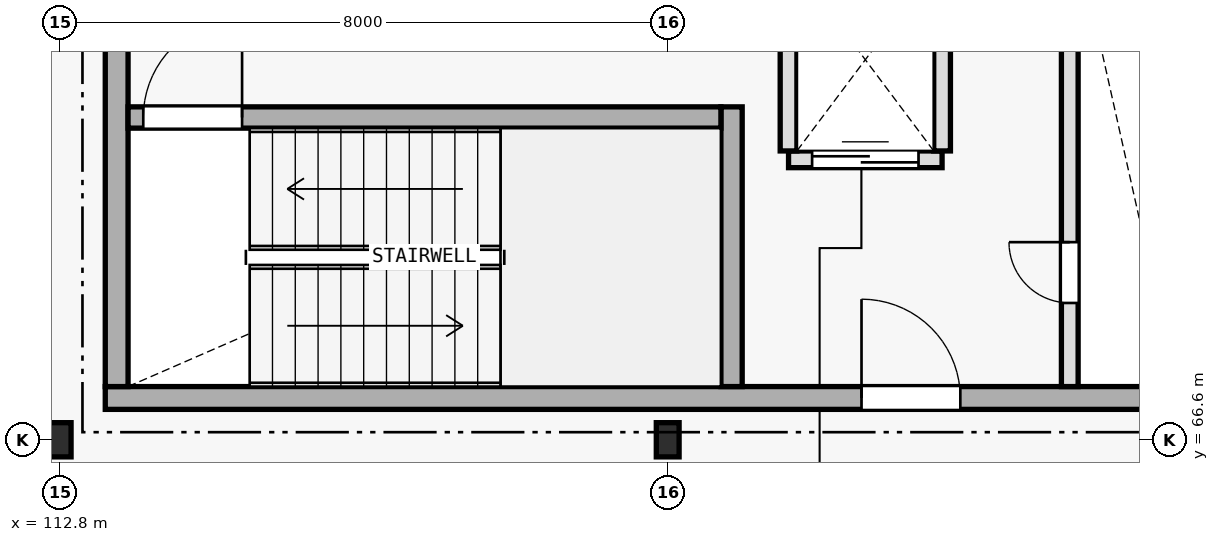
"""IFC4 building model, lengths in metres.
Left out: names, types, materials, properties, quantities, classifications, styles, units other than length and angle.
Written with IfcOpenShell. Run it as: python <this file> out.ifc"""

import sys

from ifc_helpers import new_model, si_unit, direction, frame, frame_2d, origin, origin_2d, place, context, subcontext, project, spatial, rectangle, i_section, extrude, element, fill, save


model = new_model("IFC4")
c1 = context("Model", 3, precision=1e-05, world=origin(), true_north=direction((0.0, 1.0)))
c2 = subcontext(c1, "Body", "Model", "MODEL_VIEW")
j1 = project(units=[si_unit("LENGTHUNIT", "METRE"), si_unit("PLANEANGLEUNIT", "RADIAN")], contexts=[c1])
p1 = place(None, origin())
s1 = spatial("IfcSite", under=j1, at=p1, CompositionType="ELEMENT")
p2 = place(p1, origin())
s2 = spatial("IfcBuilding", under=s1, at=p2, CompositionType="ELEMENT")
p3 = place(p2, frame((0.0, 0.0, 9.9)))
s3 = spatial("IfcBuildingStorey", under=s2, at=p3, CompositionType="ELEMENT", Elevation=9.9)
p4 = place(p3, frame((113.4, 67.15, 0.0), z_axis=(0.0, 0.0, 1.0), x_axis=(1.0, 0.0, 0.0)))
e1 = element("IfcWall", 1, at=p4, inside=s3, PredefinedType="SHEAR", context=c2, shape_type="SweptSolid", body=[
    extrude(rectangle(XDim=14.4, YDim=0.3, at=frame_2d((7.2, 0.0))), origin(), (0.0, 0.0, 1.0), 4.195),
])
p5 = place(p4, frame((9.95, 0.0, 0.0)))
e2 = element("IfcOpeningElement", 2, at=p5, cuts=e1, PredefinedType="OPENING", context=c2, shape_type="SweptSolid", body=[
    extrude(rectangle(XDim=1.3, YDim=2.2, at=frame_2d((0.65, 1.1))), frame((0.0, 0.16, 0.0), z_axis=(0.0, -1.0, 0.0), x_axis=(1.0, 0.0, 0.0)), (0.0, 0.0, 1.0), 0.32),
])
p6 = place(p3, frame((113.55, 67.3, 0.0), z_axis=(0.0, 0.0, 1.0), x_axis=(0.0, 1.0, 0.0)))
e3 = element("IfcWall", 3, at=p6, inside=s3, PredefinedType="SHEAR", context=c2, shape_type="SweptSolid", body=[
    extrude(rectangle(XDim=5.8, YDim=0.3, at=frame_2d((2.9, 0.0))), origin(), (0.0, 0.0, 1.0), 4.195),
])
p7 = place(p3, frame((121.64, 67.3, 0.0), z_axis=(0.0, 0.0, 1.0), x_axis=(0.0, 1.0, 0.0)))
e4 = element("IfcWall", 4, at=p7, inside=s3, PredefinedType="SHEAR", context=c2, shape_type="SweptSolid", body=[
    extrude(rectangle(XDim=3.68, YDim=0.28, at=frame_2d((1.84, 0.0))), origin(), (0.0, 0.0, 1.0), 4.195),
])
p8 = place(p3, frame((113.7, 70.84, 0.0), z_axis=(0.0, 0.0, 1.0), x_axis=(1.0, 0.0, 0.0)))
e5 = element("IfcWall", 5, at=p8, inside=s3, PredefinedType="SHEAR", context=c2, shape_type="SweptSolid", body=[
    extrude(rectangle(XDim=7.8, YDim=0.28, at=frame_2d((3.9, 0.0))), origin(), (0.0, 0.0, 1.0), 4.195),
])
p9 = place(p8, frame((0.2, 0.0, 0.0)))
e6 = element("IfcOpeningElement", 6, at=p9, cuts=e5, PredefinedType="OPENING", context=c2, shape_type="SweptSolid", body=[
    extrude(rectangle(XDim=1.3, YDim=2.2, at=frame_2d((0.65, 1.1))), frame((0.0, 0.15, 0.0), z_axis=(0.0, -1.0, 0.0), x_axis=(1.0, 0.0, 0.0)), (0.0, 0.0, 1.0), 0.3),
])
for number, where, z_axis, x_axis in (
    (7, (112.8, 66.6, 0.0), (0.0, 0.0, 1.0), (1.0, 0.0, 0.0)),
    (8, (120.8, 66.6, 0.0), (0.0, 0.0, 1.0), (1.0, 0.0, 0.0)),
):
    element("IfcColumn", number, at=place(p3, frame(where, z_axis=z_axis, x_axis=x_axis)), inside=s3, PredefinedType="COLUMN", context=c2, shape_type="SweptSolid", body=[
        extrude(i_section(OverallWidth=0.3, OverallDepth=0.45, WebThickness=0.014, FlangeThickness=0.026, FilletRadius=0.027, at=origin_2d()), origin(), (0.0, 0.0, 1.0), 4.2),
    ])
p10 = place(p3, frame((122.39, 70.29, 0.0), z_axis=(0.0, 0.0, 1.0), x_axis=(1.0, 0.0, 0.0)))
e9 = element("IfcWall", 9, at=p10, inside=s3, PredefinedType="PLUMBINGWALL", context=c2, shape_type="SweptSolid", body=[
    extrude(rectangle(XDim=2.02, YDim=0.22, at=frame_2d((1.01, 0.0))), origin(), (0.0, 0.0, 1.0), 3.92),
])
p11 = place(p10, frame((0.31, 0.0, 0.0)))
e10 = element("IfcOpeningElement", 10, at=p11, cuts=e9, PredefinedType="OPENING", context=c2, shape_type="SweptSolid", body=[
    extrude(rectangle(XDim=1.4, YDim=2.4, at=frame_2d((0.7, 1.2))), frame((0.0, 0.12, 0.0), z_axis=(0.0, -1.0, 0.0), x_axis=(1.0, 0.0, 0.0)), (0.0, 0.0, 1.0), 0.24),
])
for number, where, z_axis, x_axis in (
    (11, (122.39, 70.4, 0.0), (0.0, 0.0, 1.0), (0.0, 1.0, 0.0)),
    (12, (124.41, 70.4, 0.0), (0.0, 0.0, 1.0), (0.0, 1.0, 0.0)),
):
    element("IfcWall", number, at=place(p3, frame(where, z_axis=z_axis, x_axis=x_axis)), inside=s3, PredefinedType="PLUMBINGWALL", context=c2, shape_type="SweptSolid", body=[
        extrude(rectangle(XDim=2.4, YDim=0.22, at=frame_2d((1.2, 0.0))), origin(), (0.0, 0.0, 1.0), 3.92),
    ])
p12 = place(p3, frame((126.09, 67.3, 0.0), z_axis=(0.0, 0.0, 1.0), x_axis=(0.0, 1.0, 0.0)))
e13 = element("IfcWall", 13, at=p12, inside=s3, PredefinedType="PLUMBINGWALL", context=c2, shape_type="SweptSolid", body=[
    extrude(rectangle(XDim=5.8, YDim=0.22, at=frame_2d((2.9, 0.0))), origin(), (0.0, 0.0, 1.0), 3.92),
])
p13 = place(p12, frame((1.1, 0.0, 0.0)))
e14 = element("IfcOpeningElement", 14, at=p13, cuts=e13, PredefinedType="OPENING", context=c2, shape_type="SweptSolid", body=[
    extrude(rectangle(XDim=0.8, YDim=2.1, at=frame_2d((0.4, 1.05))), frame((0.0, 0.12, 0.0), z_axis=(0.0, -1.0, 0.0), x_axis=(1.0, 0.0, 0.0)), (0.0, 0.0, 1.0), 0.24),
])
p14 = place(p9, origin())
e15 = element("IfcDoor", 15, at=p14, inside=s3, OperationType="SINGLE_SWING_RIGHT", PredefinedType="DOOR", context=c2, shape_type="SweptSolid", body=[
    extrude(rectangle(XDim=1.3, YDim=2.2, at=frame_2d((0.65, 1.1))), frame((0.0, 0.025, 0.0), z_axis=(0.0, -1.0, 0.0), x_axis=(1.0, 0.0, 0.0)), (0.0, 0.0, 1.0), 0.05),
])
fill(e6, e15)
p15 = place(p11, origin())
e16 = element("IfcDoor", 16, at=p15, inside=s3, OperationType="DOUBLE_DOOR_SLIDING", PredefinedType="DOOR", context=c2, shape_type="SweptSolid", body=[
    extrude(rectangle(XDim=1.4, YDim=2.4, at=frame_2d((0.7, 1.2))), frame((0.0, 0.025, 0.0), z_axis=(0.0, -1.0, 0.0), x_axis=(1.0, 0.0, 0.0)), (0.0, 0.0, 1.0), 0.05),
])
fill(e10, e16)
p16 = place(p13, origin())
e17 = element("IfcDoor", 17, at=p16, inside=s3, OperationType="SINGLE_SWING_RIGHT", PredefinedType="DOOR", context=c2, shape_type="SweptSolid", body=[
    extrude(rectangle(XDim=0.8, YDim=2.1, at=frame_2d((0.4, 1.05))), frame((0.0, 0.025, 0.0), z_axis=(0.0, -1.0, 0.0), x_axis=(1.0, 0.0, 0.0)), (0.0, 0.0, 1.0), 0.05),
])
fill(e14, e17)
p17 = place(p5, origin())
e18 = element("IfcDoor", 18, at=p17, inside=s3, OperationType="SINGLE_SWING_LEFT", PredefinedType="DOOR", context=c2, shape_type="SweptSolid", body=[
    extrude(rectangle(XDim=1.3, YDim=2.2, at=frame_2d((0.65, 1.1))), frame((0.0, 0.025, 0.0), z_axis=(0.0, -1.0, 0.0), x_axis=(1.0, 0.0, 0.0)), (0.0, 0.0, 1.0), 0.05),
])
fill(e2, e18)
save(model, sys.argv[1])
